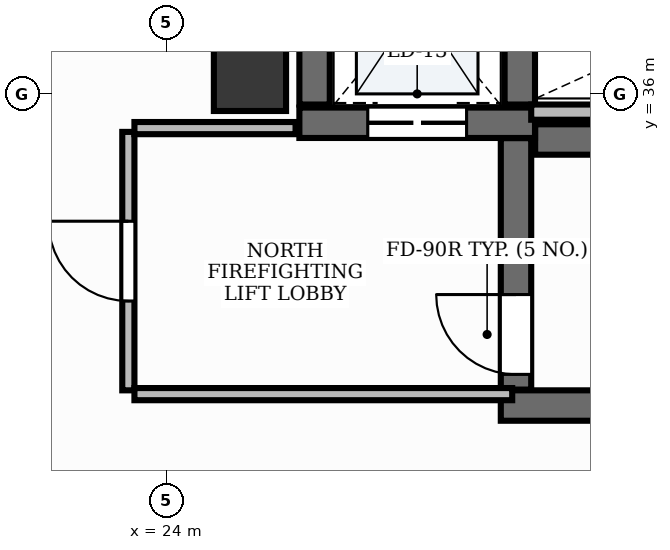
"""IFC4 building model, lengths in metres.
Left out: names, types, materials, properties, quantities, classifications, styles, units other than length and angle.
Written with IfcOpenShell. Run it as: python <this file> out.ifc"""

import sys

from ifc_helpers import new_model, si_unit, direction, frame, frame_2d, origin, origin_2d, place, context, subcontext, project, spatial, rectangle, extrude, element, fill, save


model = new_model("IFC4")
c1 = context("Model", 3, precision=1e-05, world=origin(), true_north=direction((0.0, 1.0)))
c2 = subcontext(c1, "Body", "Model", "MODEL_VIEW")
j1 = project(units=[si_unit("LENGTHUNIT", "METRE"), si_unit("PLANEANGLEUNIT", "RADIAN")], contexts=[c1])
p1 = place(None, origin())
s1 = spatial("IfcSite", under=j1, at=p1, CompositionType="ELEMENT")
p2 = place(p1, origin())
s2 = spatial("IfcBuilding", under=s1, at=p2, CompositionType="ELEMENT")
p3 = place(p2, frame((0.0, 0.0, 273.0)))
s3 = spatial("IfcBuildingStorey", under=s2, at=p3, CompositionType="ELEMENT", Elevation=273.0)
p4 = place(p3, frame((28.852, 35.4, 0.0), z_axis=(0.0, 0.0, 1.0), x_axis=(1.0, 0.0, 0.0)))
e1 = element("IfcWall", 1, at=p4, inside=s3, PredefinedType="SHEAR", context=c2, shape_type="SweptSolid", body=[
    extrude(rectangle(XDim=8.198, YDim=0.4, at=frame_2d((4.099, 0.0))), origin(), (0.0, 0.0, 1.0), 3.88),
])
p5 = place(p3, frame((28.4, 31.9, 0.0), z_axis=(0.0, 0.0, 1.0), x_axis=(1.0, 0.0, 0.0)))
e2 = element("IfcWall", 2, at=p5, inside=s3, PredefinedType="SHEAR", context=c2, shape_type="SweptSolid", body=[
    extrude(rectangle(XDim=8.65, YDim=0.4, at=frame_2d((4.325, 0.0))), origin(), (0.0, 0.0, 1.0), 3.88),
])
p6 = place(p3, frame((28.6, 32.11, 0.0), z_axis=(0.0, 0.0, 1.0), x_axis=(0.0, 1.0, 0.0)))
e3 = element("IfcWall", 3, at=p6, inside=s3, PredefinedType="SHEAR", context=c2, shape_type="SweptSolid", body=[
    extrude(rectangle(XDim=3.308, YDim=0.4, at=frame_2d((1.654, 0.0))), origin(), (0.0, 0.0, 1.0), 3.88),
])
p7 = place(p6, frame((0.2, 0.0, 0.0)))
e4 = element("IfcOpeningElement", 4, at=p7, cuts=e3, PredefinedType="OPENING", context=c2, shape_type="SweptSolid", body=[
    extrude(rectangle(XDim=1.05, YDim=2.15, at=frame_2d((0.525, 1.075))), frame((0.0, 0.215, 0.0), z_axis=(0.0, -1.0, 0.0), x_axis=(1.0, 0.0, 0.0)), (0.0, 0.0, 1.0), 0.43),
])
p8 = place(p3, frame((25.75, 35.62, 0.0), z_axis=(0.0, 0.0, 1.0), x_axis=(1.0, 0.0, 0.0)))
e5 = element("IfcWall", 5, at=p8, inside=s3, PredefinedType="SHEAR", context=c2, shape_type="SweptSolid", body=[
    extrude(rectangle(XDim=3.1, YDim=0.4, at=frame_2d((1.55, 0.0))), origin(), (0.0, 0.0, 1.0), 3.88),
])
p9 = place(p8, frame((0.9, 0.0, 0.0)))
e6 = element("IfcOpeningElement", 6, at=p9, cuts=e5, PredefinedType="OPENING", context=c2, shape_type="SweptSolid", body=[
    extrude(rectangle(XDim=1.3, YDim=2.2, at=frame_2d((0.65, 1.1))), frame((0.0, 0.215, 0.0), z_axis=(0.0, -1.0, 0.0), x_axis=(1.0, 0.0, 0.0)), (0.0, 0.0, 1.0), 0.43),
])
for number, where, z_axis, x_axis in (
    (7, (25.95, 35.86, 0.0), (0.0, 0.0, 1.0), (0.0, 1.0, 0.0)),
    (8, (28.65, 35.86, 0.0), (0.0, 0.0, 1.0), (0.0, 1.0, 0.0)),
):
    element("IfcWall", number, at=place(p3, frame(where, z_axis=z_axis, x_axis=x_axis)), inside=s3, PredefinedType="SHEAR", context=c2, shape_type="SweptSolid", body=[
        extrude(rectangle(XDim=2.7, YDim=0.4, at=frame_2d((1.35, 0.0))), origin(), (0.0, 0.0, 1.0), 3.88),
    ])
p10 = place(p3, frame((25.1, 36.25, -0.0), z_axis=(0.0, 0.0, 1.0), x_axis=(1.0, 0.0, 0.0)))
e9 = element("IfcColumn", 9, at=p10, inside=s3, PredefinedType="PILASTER", context=c2, shape_type="SweptSolid", body=[
    extrude(rectangle(XDim=0.95, YDim=0.95, at=origin_2d()), origin(), (0.0, 0.0, 1.0), 3.881),
])
p11 = place(p3, frame((28.8, 35.76, 0.0), z_axis=(0.0, 0.0, 1.0), x_axis=(1.0, 0.0, 0.0)))
e10 = element("IfcWall", 10, at=p11, inside=s3, PredefinedType="PARTITIONING", context=c2, shape_type="SweptSolid", body=[
    extrude(rectangle(XDim=4.57, YDim=0.2, at=frame_2d((2.285, 0.0))), origin(), (0.0, 0.0, 1.0), 2.89),
])
p12 = place(p3, frame((23.5, 32.1, 0.0), z_axis=(0.0, 0.0, 1.0), x_axis=(0.0, 1.0, 0.0)))
e11 = element("IfcWall", 11, at=p12, inside=s3, PredefinedType="PARTITIONING", context=c2, shape_type="SweptSolid", body=[
    extrude(rectangle(XDim=3.4, YDim=0.16, at=frame_2d((1.7, 0.0))), origin(), (0.0, 0.0, 1.0), 2.89),
])
p13 = place(p12, frame((1.175, 0.0, 0.0)))
e12 = element("IfcOpeningElement", 12, at=p13, cuts=e11, PredefinedType="OPENING", context=c2, shape_type="SweptSolid", body=[
    extrude(rectangle(XDim=1.05, YDim=2.15, at=frame_2d((0.525, 1.075))), frame((0.0, 0.095, 0.0), z_axis=(0.0, -1.0, 0.0), x_axis=(1.0, 0.0, 0.0)), (0.0, 0.0, 1.0), 0.19),
])
p14 = place(p3, frame((23.58, 32.05, 0.0), z_axis=(0.0, 0.0, 1.0), x_axis=(1.0, 0.0, 0.0)))
e13 = element("IfcWall", 13, at=p14, inside=s3, PredefinedType="PARTITIONING", context=c2, shape_type="SweptSolid", body=[
    extrude(rectangle(XDim=4.97, YDim=0.16, at=frame_2d((2.485, 0.0))), origin(), (0.0, 0.0, 1.0), 2.89),
])
p15 = place(p3, frame((23.58, 35.55, 0.0), z_axis=(0.0, 0.0, 1.0), x_axis=(1.0, 0.0, 0.0)))
e14 = element("IfcWall", 14, at=p15, inside=s3, PredefinedType="PARTITIONING", context=c2, shape_type="SweptSolid", body=[
    extrude(rectangle(XDim=2.12, YDim=0.16, at=frame_2d((1.06, 0.0))), origin(), (0.0, 0.0, 1.0), 2.89),
])
p16 = place(p7, origin())
e15 = element("IfcDoor", 15, at=p16, inside=s3, OperationType="SINGLE_SWING_RIGHT", PredefinedType="DOOR", context=c2, shape_type="SweptSolid", body=[
    extrude(rectangle(XDim=1.05, YDim=2.15, at=frame_2d((0.525, 1.075))), frame((0.0, 0.025, 0.0), z_axis=(0.0, -1.0, 0.0), x_axis=(1.0, 0.0, 0.0)), (0.0, 0.0, 1.0), 0.05),
])
fill(e4, e15)
p17 = place(p9, origin())
e16 = element("IfcDoor", 16, at=p17, inside=s3, OperationType="DOUBLE_DOOR_SLIDING", PredefinedType="DOOR", context=c2, shape_type="SweptSolid", body=[
    extrude(rectangle(XDim=1.3, YDim=2.2, at=frame_2d((0.65, 1.1))), frame((0.0, 0.025, 0.0), z_axis=(0.0, -1.0, 0.0), x_axis=(1.0, 0.0, 0.0)), (0.0, 0.0, 1.0), 0.05),
])
fill(e6, e16)
p18 = place(p13, origin())
e17 = element("IfcDoor", 17, at=p18, inside=s3, OperationType="SINGLE_SWING_RIGHT", PredefinedType="DOOR", context=c2, shape_type="SweptSolid", body=[
    extrude(rectangle(XDim=1.05, YDim=2.15, at=frame_2d((0.525, 1.075))), frame((0.0, 0.025, 0.0), z_axis=(0.0, -1.0, 0.0), x_axis=(1.0, 0.0, 0.0)), (0.0, 0.0, 1.0), 0.05),
])
fill(e12, e17)
save(model, sys.argv[1])
